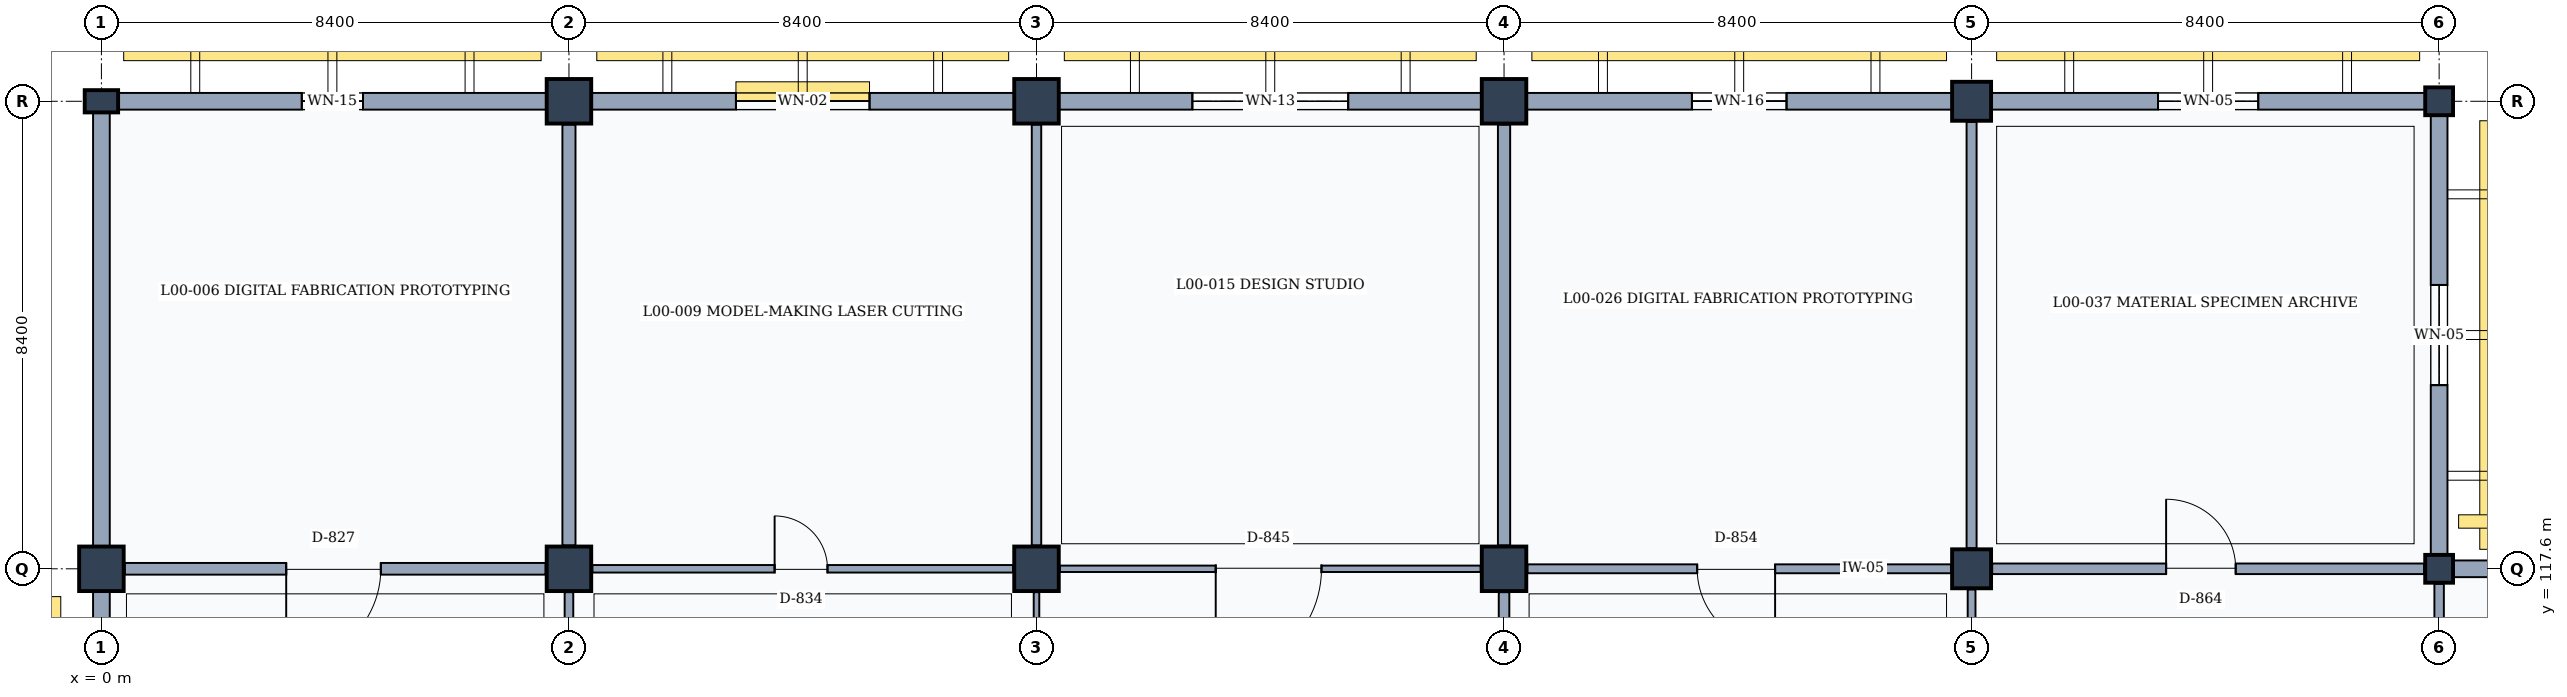
"""IFC4 building model, lengths in metres.
Left out: names, types, materials, properties, quantities, classifications, styles, units other than length and angle.
Written with IfcOpenShell. Run it as: python <this file> out.ifc"""

import sys

from ifc_helpers import new_model, si_unit, direction, frame, frame_2d, origin, origin_2d, place, context, subcontext, project, spatial, rectangle, extrude, element, fill, save


model = new_model("IFC4")
c1 = context("Model", 3, precision=1e-05, world=origin(), true_north=direction((0.0, 1.0)))
c2 = subcontext(c1, "Body", "Model", "MODEL_VIEW")
j1 = project(units=[si_unit("LENGTHUNIT", "METRE"), si_unit("PLANEANGLEUNIT", "RADIAN")], contexts=[c1])
p1 = place(None, origin())
s1 = spatial("IfcSite", under=j1, at=p1, CompositionType="ELEMENT")
p2 = place(p1, origin())
s2 = spatial("IfcBuilding", under=s1, at=p2, CompositionType="ELEMENT")
p3 = place(p2, origin())
s3 = spatial("IfcBuildingStorey", under=s2, at=p3, CompositionType="ELEMENT", Elevation=0.0)
p4 = place(p3, frame((0.0, 117.6, 0.0), z_axis=(0.0, 0.0, 1.0), x_axis=(1.0, 0.0, 0.0)))
e1 = element("IfcColumn", 1, at=p4, inside=s3, PredefinedType="COLUMN", context=c2, shape_type="SweptSolid", body=[
    extrude(rectangle(XDim=0.8, YDim=0.8, at=origin_2d()), origin(), (0.0, 0.0, 1.0), 4.8),
])
p5 = place(p3, frame((0.0, 126.0, 0.0), z_axis=(0.0, 0.0, 1.0), x_axis=(1.0, 0.0, 0.0)))
e2 = element("IfcColumn", 2, at=p5, inside=s3, PredefinedType="PILASTER", context=c2, shape_type="SweptSolid", body=[
    extrude(rectangle(XDim=0.6, YDim=0.4, at=origin_2d()), origin(), (0.0, 0.0, 1.0), 4.8),
])
for number, where, z_axis, x_axis in (
    (3, (8.4, 117.6, 0.0), (0.0, 0.0, 1.0), (1.0, 0.0, 0.0)),
    (4, (8.4, 126.0, 0.0), (0.0, 0.0, 1.0), (1.0, 0.0, 0.0)),
    (5, (16.8, 117.6, 0.0), (0.0, 0.0, 1.0), (1.0, 0.0, 0.0)),
    (6, (16.8, 126.0, 0.0), (0.0, 0.0, 1.0), (1.0, 0.0, 0.0)),
    (7, (25.2, 117.6, 0.0), (0.0, 0.0, 1.0), (1.0, 0.0, 0.0)),
    (8, (25.2, 126.0, 0.0), (0.0, 0.0, 1.0), (1.0, 0.0, 0.0)),
):
    element("IfcColumn", number, at=place(p3, frame(where, z_axis=z_axis, x_axis=x_axis)), inside=s3, PredefinedType="COLUMN", context=c2, shape_type="SweptSolid", body=[
        extrude(rectangle(XDim=0.8, YDim=0.8, at=origin_2d()), origin(), (0.0, 0.0, 1.0), 4.8),
    ])
for number, where, z_axis, x_axis in (
    (9, (33.6, 117.6, 0.0), (0.0, 0.0, 1.0), (1.0, 0.0, 0.0)),
    (10, (33.6, 126.0, 0.0), (0.0, 0.0, 1.0), (1.0, 0.0, 0.0)),
):
    element("IfcColumn", number, at=place(p3, frame(where, z_axis=z_axis, x_axis=x_axis)), inside=s3, PredefinedType="COLUMN", context=c2, shape_type="SweptSolid", body=[
        extrude(rectangle(XDim=0.7, YDim=0.7, at=origin_2d()), origin(), (0.0, 0.0, 1.0), 4.8),
    ])
for number, where, z_axis, x_axis in (
    (11, (42.0, 117.6, 0.0), (0.0, 0.0, 1.0), (1.0, 0.0, 0.0)),
    (12, (42.0, 126.0, 0.0), (0.0, 0.0, 1.0), (1.0, 0.0, 0.0)),
):
    element("IfcColumn", number, at=place(p3, frame(where, z_axis=z_axis, x_axis=x_axis)), inside=s3, PredefinedType="COLUMN", context=c2, shape_type="SweptSolid", body=[
        extrude(rectangle(XDim=0.5, YDim=0.5, at=origin_2d()), origin(), (0.0, 0.0, 1.0), 4.8),
    ])
p6 = place(p3, frame((0.0, 109.6, 0.0), z_axis=(0.0, 0.0, 1.0), x_axis=(0.0, 1.0, 0.0)))
e13 = element("IfcWall", 13, at=p6, inside=s3, PredefinedType="SOLIDWALL", context=c2, shape_type="SweptSolid", body=[
    extrude(rectangle(XDim=7.6, YDim=0.3, at=frame_2d((3.8, 0.0))), origin(), (0.0, 0.0, 1.0), 3.96),
])
p7 = place(p6, frame((2.3, 0.0, 0.95)))
e14 = element("IfcOpeningElement", 14, at=p7, cuts=e13, PredefinedType="OPENING", context=c2, shape_type="SweptSolid", body=[
    extrude(rectangle(XDim=3.0, YDim=1.8, at=frame_2d((1.5, 0.9))), frame((0.0, 0.16, 0.0), z_axis=(0.0, -1.0, 0.0), x_axis=(1.0, 0.0, 0.0)), (0.0, 0.0, 1.0), 0.32),
])
p8 = place(p3, frame((0.3, 126.0, 0.0), z_axis=(0.0, 0.0, 1.0), x_axis=(1.0, 0.0, 0.0)))
e15 = element("IfcWall", 15, at=p8, inside=s3, PredefinedType="SOLIDWALL", context=c2, shape_type="SweptSolid", body=[
    extrude(rectangle(XDim=7.7, YDim=0.3, at=frame_2d((3.85, 0.0))), origin(), (0.0, 0.0, 1.0), 3.96),
])
p9 = place(p8, frame((3.3, 0.0, 0.95)))
e16 = element("IfcOpeningElement", 16, at=p9, cuts=e15, PredefinedType="OPENING", context=c2, shape_type="SweptSolid", body=[
    extrude(rectangle(XDim=1.1, YDim=1.95, at=frame_2d((0.55, 0.975))), frame((0.0, 0.16, 0.0), z_axis=(0.0, -1.0, 0.0), x_axis=(1.0, 0.0, 0.0)), (0.0, 0.0, 1.0), 0.32),
])
p10 = place(p3, frame((0.0, 118.0, 0.0), z_axis=(0.0, 0.0, 1.0), x_axis=(0.0, 1.0, 0.0)))
e17 = element("IfcWall", 17, at=p10, inside=s3, PredefinedType="SOLIDWALL", context=c2, shape_type="SweptSolid", body=[
    extrude(rectangle(XDim=7.8, YDim=0.3, at=frame_2d((3.9, 0.0))), origin(), (0.0, 0.0, 1.0), 3.96),
])
p11 = place(p3, frame((8.8, 126.0, 0.0), z_axis=(0.0, 0.0, 1.0), x_axis=(1.0, 0.0, 0.0)))
e18 = element("IfcWall", 18, at=p11, inside=s3, PredefinedType="SOLIDWALL", context=c2, shape_type="SweptSolid", body=[
    extrude(rectangle(XDim=7.6, YDim=0.3, at=frame_2d((3.8, 0.0))), origin(), (0.0, 0.0, 1.0), 3.96),
])
p12 = place(p11, frame((2.6, 0.0, 0.95)))
e19 = element("IfcOpeningElement", 19, at=p12, cuts=e18, PredefinedType="OPENING", context=c2, shape_type="SweptSolid", body=[
    extrude(rectangle(XDim=2.4, YDim=1.8, at=frame_2d((1.2, 0.9))), frame((0.0, 0.16, 0.0), z_axis=(0.0, -1.0, 0.0), x_axis=(1.0, 0.0, 0.0)), (0.0, 0.0, 1.0), 0.32),
])
p13 = place(p3, frame((17.2, 126.0, 0.0), z_axis=(0.0, 0.0, 1.0), x_axis=(1.0, 0.0, 0.0)))
e20 = element("IfcWall", 20, at=p13, inside=s3, PredefinedType="SOLIDWALL", context=c2, shape_type="SweptSolid", body=[
    extrude(rectangle(XDim=7.6, YDim=0.3, at=frame_2d((3.8, 0.0))), origin(), (0.0, 0.0, 1.0), 3.96),
])
p14 = place(p13, frame((2.4, 0.0, 0.95)))
e21 = element("IfcOpeningElement", 21, at=p14, cuts=e20, PredefinedType="OPENING", context=c2, shape_type="SweptSolid", body=[
    extrude(rectangle(XDim=2.8, YDim=1.65, at=frame_2d((1.4, 0.825))), frame((0.0, 0.16, 0.0), z_axis=(0.0, -1.0, 0.0), x_axis=(1.0, 0.0, 0.0)), (0.0, 0.0, 1.0), 0.32),
])
p15 = place(p3, frame((25.6, 126.0, 0.0), z_axis=(0.0, 0.0, 1.0), x_axis=(1.0, 0.0, 0.0)))
e22 = element("IfcWall", 22, at=p15, inside=s3, PredefinedType="SOLIDWALL", context=c2, shape_type="SweptSolid", body=[
    extrude(rectangle(XDim=7.65, YDim=0.3, at=frame_2d((3.825, 0.0))), origin(), (0.0, 0.0, 1.0), 3.96),
])
p16 = place(p15, frame((2.975, 0.0, 0.95)))
e23 = element("IfcOpeningElement", 23, at=p16, cuts=e22, PredefinedType="OPENING", context=c2, shape_type="SweptSolid", body=[
    extrude(rectangle(XDim=1.7, YDim=1.55, at=frame_2d((0.85, 0.775))), frame((0.0, 0.16, 0.0), z_axis=(0.0, -1.0, 0.0), x_axis=(1.0, 0.0, 0.0)), (0.0, 0.0, 1.0), 0.32),
])
p17 = place(p3, frame((33.95, 126.0, 0.0), z_axis=(0.0, 0.0, 1.0), x_axis=(1.0, 0.0, 0.0)))
e24 = element("IfcWall", 24, at=p17, inside=s3, PredefinedType="SOLIDWALL", context=c2, shape_type="SweptSolid", body=[
    extrude(rectangle(XDim=7.8, YDim=0.3, at=frame_2d((3.9, 0.0))), origin(), (0.0, 0.0, 1.0), 3.96),
])
p18 = place(p17, frame((3.0, 0.0, 0.95)))
e25 = element("IfcOpeningElement", 25, at=p18, cuts=e24, PredefinedType="OPENING", context=c2, shape_type="SweptSolid", body=[
    extrude(rectangle(XDim=1.8, YDim=1.5, at=frame_2d((0.9, 0.75))), frame((0.0, 0.16, 0.0), z_axis=(0.0, -1.0, 0.0), x_axis=(1.0, 0.0, 0.0)), (0.0, 0.0, 1.0), 0.32),
])
p19 = place(p3, frame((42.0, 125.75, 0.0), z_axis=(0.0, 0.0, 1.0), x_axis=(0.0, -1.0, 0.0)))
e26 = element("IfcWall", 26, at=p19, inside=s3, PredefinedType="SOLIDWALL", context=c2, shape_type="SweptSolid", body=[
    extrude(rectangle(XDim=7.9, YDim=0.3, at=frame_2d((3.95, 0.0))), origin(), (0.0, 0.0, 1.0), 3.96),
])
p20 = place(p19, frame((3.05, 0.0, 0.95)))
e27 = element("IfcOpeningElement", 27, at=p20, cuts=e26, PredefinedType="OPENING", context=c2, shape_type="SweptSolid", body=[
    extrude(rectangle(XDim=1.8, YDim=1.5, at=frame_2d((0.9, 0.75))), frame((0.0, 0.16, 0.0), z_axis=(0.0, -1.0, 0.0), x_axis=(1.0, 0.0, 0.0)), (0.0, 0.0, 1.0), 0.32),
])
p21 = place(p3, frame((42.25, 117.6, 0.0), z_axis=(0.0, 0.0, 1.0), x_axis=(1.0, 0.0, 0.0)))
e28 = element("IfcWall", 28, at=p21, inside=s3, PredefinedType="SOLIDWALL", context=c2, shape_type="SweptSolid", body=[
    extrude(rectangle(XDim=7.85, YDim=0.3, at=frame_2d((3.925, 0.0))), origin(), (0.0, 0.0, 1.0), 3.96),
])
p22 = place(p21, frame((2.525, 0.0, 0.95)))
e29 = element("IfcOpeningElement", 29, at=p22, cuts=e28, PredefinedType="OPENING", context=c2, shape_type="SweptSolid", body=[
    extrude(rectangle(XDim=2.8, YDim=1.65, at=frame_2d((1.4, 0.825))), frame((0.0, 0.16, 0.0), z_axis=(0.0, -1.0, 0.0), x_axis=(1.0, 0.0, 0.0)), (0.0, 0.0, 1.0), 0.32),
])
p23 = place(p3, frame((8.4, 109.645, 0.0), z_axis=(0.0, 0.0, 1.0), x_axis=(0.0, 1.0, 0.0)))
e30 = element("IfcWall", 30, at=p23, inside=s3, PredefinedType="PARTITIONING", context=c2, shape_type="SweptSolid", body=[
    extrude(rectangle(XDim=7.535, YDim=0.155, at=frame_2d((3.768, 0.0))), origin(), (0.0, 0.0, 1.0), 3.92),
])
p24 = place(p3, frame((0.42, 117.6, 0.0), z_axis=(0.0, 0.0, 1.0), x_axis=(1.0, 0.0, 0.0)))
e31 = element("IfcWall", 31, at=p24, inside=s3, PredefinedType="PARTITIONING", context=c2, shape_type="SweptSolid", body=[
    extrude(rectangle(XDim=7.56, YDim=0.21, at=frame_2d((3.78, 0.0))), origin(), (0.0, 0.0, 1.0), 3.87),
])
p25 = place(p24, frame((2.9, 0.0, 0.0)))
e32 = element("IfcOpeningElement", 32, at=p25, cuts=e31, PredefinedType="OPENING", context=c2, shape_type="SweptSolid", body=[
    extrude(rectangle(XDim=1.7, YDim=2.3, at=frame_2d((0.85, 1.15))), frame((0.0, 0.115, 0.0), z_axis=(0.0, -1.0, 0.0), x_axis=(1.0, 0.0, 0.0)), (0.0, 0.0, 1.0), 0.23),
])
p26 = place(p3, frame((8.4, 118.02, 0.0), z_axis=(0.0, 0.0, 1.0), x_axis=(0.0, 1.0, 0.0)))
e33 = element("IfcWall", 33, at=p26, inside=s3, PredefinedType="PARTITIONING", context=c2, shape_type="SweptSolid", body=[
    extrude(rectangle(XDim=7.56, YDim=0.235, at=frame_2d((3.78, 0.0))), origin(), (0.0, 0.0, 1.0), 3.92),
])
p27 = place(p3, frame((16.8, 109.645, 0.0), z_axis=(0.0, 0.0, 1.0), x_axis=(0.0, 1.0, 0.0)))
e34 = element("IfcWall", 34, at=p27, inside=s3, PredefinedType="MOVABLE", context=c2, shape_type="SweptSolid", body=[
    extrude(rectangle(XDim=7.535, YDim=0.1, at=frame_2d((3.768, 0.0))), origin(), (0.0, 0.0, 1.0), 3.92),
])
p28 = place(p27, frame((3.25, 0.0, 0.0)))
e35 = element("IfcOpeningElement", 35, at=p28, cuts=e34, PredefinedType="OPENING", context=c2, shape_type="SweptSolid", body=[
    extrude(rectangle(XDim=1.0, YDim=2.15, at=frame_2d((0.5, 1.075))), frame((0.0, 0.06, 0.0), z_axis=(0.0, -1.0, 0.0), x_axis=(1.0, 0.0, 0.0)), (0.0, 0.0, 1.0), 0.12),
])
p29 = place(p3, frame((8.82, 117.6, 0.0), z_axis=(0.0, 0.0, 1.0), x_axis=(1.0, 0.0, 0.0)))
e36 = element("IfcWall", 36, at=p29, inside=s3, PredefinedType="PARTITIONING", context=c2, shape_type="SweptSolid", body=[
    extrude(rectangle(XDim=7.56, YDim=0.135, at=frame_2d((3.78, 0.0))), origin(), (0.0, 0.0, 1.0), 3.87),
])
p30 = place(p29, frame((3.275, 0.0, 0.0)))
e37 = element("IfcOpeningElement", 37, at=p30, cuts=e36, PredefinedType="OPENING", context=c2, shape_type="SweptSolid", body=[
    extrude(rectangle(XDim=0.95, YDim=2.15, at=frame_2d((0.475, 1.075))), frame((0.0, 0.077, 0.0), z_axis=(0.0, -1.0, 0.0), x_axis=(1.0, 0.0, 0.0)), (0.0, 0.0, 1.0), 0.155),
])
p31 = place(p3, frame((16.8, 118.02, 0.0), z_axis=(0.0, 0.0, 1.0), x_axis=(0.0, 1.0, 0.0)))
e38 = element("IfcWall", 38, at=p31, inside=s3, PredefinedType="PARTITIONING", context=c2, shape_type="SweptSolid", body=[
    extrude(rectangle(XDim=7.56, YDim=0.17, at=frame_2d((3.78, 0.0))), origin(), (0.0, 0.0, 1.0), 3.92),
])
p32 = place(p3, frame((25.2, 109.62, 0.0), z_axis=(0.0, 0.0, 1.0), x_axis=(0.0, 1.0, 0.0)))
e39 = element("IfcWall", 39, at=p32, inside=s3, PredefinedType="PARTITIONING", context=c2, shape_type="SweptSolid", body=[
    extrude(rectangle(XDim=7.56, YDim=0.19, at=frame_2d((3.78, 0.0))), origin(), (0.0, 0.0, 1.0), 3.92),
])
p33 = place(p3, frame((17.22, 117.6, 0.0), z_axis=(0.0, 0.0, 1.0), x_axis=(1.0, 0.0, 0.0)))
e40 = element("IfcWall", 40, at=p33, inside=s3, PredefinedType="PARTITIONING", context=c2, shape_type="SweptSolid", body=[
    extrude(rectangle(XDim=7.56, YDim=0.115, at=frame_2d((3.78, 0.0))), origin(), (0.0, 0.0, 1.0), 3.87),
])
p34 = place(p33, frame((2.8, 0.0, 0.0)))
e41 = element("IfcOpeningElement", 41, at=p34, cuts=e40, PredefinedType="OPENING", context=c2, shape_type="SweptSolid", body=[
    extrude(rectangle(XDim=1.9, YDim=2.4, at=frame_2d((0.95, 1.2))), frame((0.0, 0.067, 0.0), z_axis=(0.0, -1.0, 0.0), x_axis=(1.0, 0.0, 0.0)), (0.0, 0.0, 1.0), 0.135),
])
p35 = place(p3, frame((25.2, 118.02, 0.0), z_axis=(0.0, 0.0, 1.0), x_axis=(0.0, 1.0, 0.0)))
e42 = element("IfcWall", 42, at=p35, inside=s3, PredefinedType="PARTITIONING", context=c2, shape_type="SweptSolid", body=[
    extrude(rectangle(XDim=7.56, YDim=0.22, at=frame_2d((3.78, 0.0))), origin(), (0.0, 0.0, 1.0), 3.92),
])
p36 = place(p3, frame((33.6, 109.57, 0.0), z_axis=(0.0, 0.0, 1.0), x_axis=(0.0, 1.0, 0.0)))
e43 = element("IfcWall", 43, at=p36, inside=s3, PredefinedType="PARTITIONING", context=c2, shape_type="SweptSolid", body=[
    extrude(rectangle(XDim=7.66, YDim=0.14, at=frame_2d((3.83, 0.0))), origin(), (0.0, 0.0, 1.0), 3.92),
])
p37 = place(p3, frame((25.62, 117.6, 0.0), z_axis=(0.0, 0.0, 1.0), x_axis=(1.0, 0.0, 0.0)))
e44 = element("IfcWall", 44, at=p37, inside=s3, PredefinedType="PARTITIONING", context=c2, shape_type="SweptSolid", body=[
    extrude(rectangle(XDim=7.61, YDim=0.16, at=frame_2d((3.805, 0.0))), origin(), (0.0, 0.0, 1.0), 3.87),
])
p38 = place(p37, frame((3.05, 0.0, 0.0)))
e45 = element("IfcOpeningElement", 45, at=p38, cuts=e44, PredefinedType="OPENING", context=c2, shape_type="SweptSolid", body=[
    extrude(rectangle(XDim=1.4, YDim=2.25, at=frame_2d((0.7, 1.125))), frame((0.0, 0.09, 0.0), z_axis=(0.0, -1.0, 0.0), x_axis=(1.0, 0.0, 0.0)), (0.0, 0.0, 1.0), 0.18),
])
p39 = place(p3, frame((33.6, 117.97, 0.0), z_axis=(0.0, 0.0, 1.0), x_axis=(0.0, 1.0, 0.0)))
e46 = element("IfcWall", 46, at=p39, inside=s3, PredefinedType="PARTITIONING", context=c2, shape_type="SweptSolid", body=[
    extrude(rectangle(XDim=7.66, YDim=0.18, at=frame_2d((3.83, 0.0))), origin(), (0.0, 0.0, 1.0), 3.92),
])
p40 = place(p3, frame((42.0, 109.47, 0.0), z_axis=(0.0, 0.0, 1.0), x_axis=(0.0, 1.0, 0.0)))
e47 = element("IfcWall", 47, at=p40, inside=s3, PredefinedType="PARTITIONING", context=c2, shape_type="SweptSolid", body=[
    extrude(rectangle(XDim=7.86, YDim=0.17, at=frame_2d((3.93, 0.0))), origin(), (0.0, 0.0, 1.0), 3.92),
])
p41 = place(p3, frame((33.97, 117.6, 0.0), z_axis=(0.0, 0.0, 1.0), x_axis=(1.0, 0.0, 0.0)))
e48 = element("IfcWall", 48, at=p41, inside=s3, PredefinedType="PARTITIONING", context=c2, shape_type="SweptSolid", body=[
    extrude(rectangle(XDim=7.76, YDim=0.19, at=frame_2d((3.88, 0.0))), origin(), (0.0, 0.0, 1.0), 3.87),
])
p42 = place(p41, frame((3.125, 0.0, 0.0)))
e49 = element("IfcOpeningElement", 49, at=p42, cuts=e48, PredefinedType="OPENING", context=c2, shape_type="SweptSolid", body=[
    extrude(rectangle(XDim=1.25, YDim=2.3, at=frame_2d((0.625, 1.15))), frame((0.0, 0.105, 0.0), z_axis=(0.0, -1.0, 0.0), x_axis=(1.0, 0.0, 0.0)), (0.0, 0.0, 1.0), 0.21),
])
p43 = place(p9, origin())
e50 = element("IfcWindow", 50, at=p43, inside=s3, PartitioningType="SINGLE_PANEL", PredefinedType="WINDOW", context=c2, shape_type="SweptSolid", body=[
    extrude(rectangle(XDim=1.1, YDim=1.95, at=frame_2d((0.55, 0.975))), frame((0.0, 0.03, 0.0), z_axis=(0.0, -1.0, 0.0), x_axis=(1.0, 0.0, 0.0)), (0.0, 0.0, 1.0), 0.06),
])
fill(e16, e50)
p44 = place(p12, origin())
e51 = element("IfcWindow", 51, at=p44, inside=s3, PartitioningType="SINGLE_PANEL", PredefinedType="WINDOW", context=c2, shape_type="SweptSolid", body=[
    extrude(rectangle(XDim=2.4, YDim=1.8, at=frame_2d((1.2, 0.9))), frame((0.0, 0.03, 0.0), z_axis=(0.0, -1.0, 0.0), x_axis=(1.0, 0.0, 0.0)), (0.0, 0.0, 1.0), 0.06),
])
fill(e19, e51)
p45 = place(p14, origin())
e52 = element("IfcWindow", 52, at=p45, inside=s3, PartitioningType="SINGLE_PANEL", PredefinedType="WINDOW", context=c2, shape_type="SweptSolid", body=[
    extrude(rectangle(XDim=2.8, YDim=1.65, at=frame_2d((1.4, 0.825))), frame((0.0, 0.03, 0.0), z_axis=(0.0, -1.0, 0.0), x_axis=(1.0, 0.0, 0.0)), (0.0, 0.0, 1.0), 0.06),
])
fill(e21, e52)
p46 = place(p16, origin())
e53 = element("IfcWindow", 53, at=p46, inside=s3, PartitioningType="SINGLE_PANEL", PredefinedType="WINDOW", context=c2, shape_type="SweptSolid", body=[
    extrude(rectangle(XDim=1.7, YDim=1.55, at=frame_2d((0.85, 0.775))), frame((0.0, 0.03, 0.0), z_axis=(0.0, -1.0, 0.0), x_axis=(1.0, 0.0, 0.0)), (0.0, 0.0, 1.0), 0.06),
])
fill(e23, e53)
p47 = place(p18, origin())
e54 = element("IfcWindow", 54, at=p47, inside=s3, PartitioningType="SINGLE_PANEL", PredefinedType="WINDOW", context=c2, shape_type="SweptSolid", body=[
    extrude(rectangle(XDim=1.8, YDim=1.5, at=frame_2d((0.9, 0.75))), frame((0.0, 0.03, 0.0), z_axis=(0.0, -1.0, 0.0), x_axis=(1.0, 0.0, 0.0)), (0.0, 0.0, 1.0), 0.06),
])
fill(e25, e54)
p48 = place(p20, origin())
e55 = element("IfcWindow", 55, at=p48, inside=s3, PartitioningType="SINGLE_PANEL", PredefinedType="WINDOW", context=c2, shape_type="SweptSolid", body=[
    extrude(rectangle(XDim=1.8, YDim=1.5, at=frame_2d((0.9, 0.75))), frame((0.0, 0.03, 0.0), z_axis=(0.0, -1.0, 0.0), x_axis=(1.0, 0.0, 0.0)), (0.0, 0.0, 1.0), 0.06),
])
fill(e27, e55)
p49 = place(p25, frame((1.7, 0.0, 0.0), z_axis=(0.0, 0.0, 1.0), x_axis=(-1.0, 0.0, 0.0)))
e56 = element("IfcDoor", 56, at=p49, inside=s3, OperationType="SINGLE_SWING_RIGHT", PredefinedType="DOOR", context=c2, shape_type="SweptSolid", body=[
    extrude(rectangle(XDim=1.7, YDim=2.3, at=frame_2d((0.85, 1.15))), frame((0.0, 0.025, 0.0), z_axis=(0.0, -1.0, 0.0), x_axis=(1.0, 0.0, 0.0)), (0.0, 0.0, 1.0), 0.05),
])
fill(e32, e56)
p50 = place(p30, origin())
e57 = element("IfcDoor", 57, at=p50, inside=s3, OperationType="SINGLE_SWING_LEFT", PredefinedType="DOOR", context=c2, shape_type="SweptSolid", body=[
    extrude(rectangle(XDim=0.95, YDim=2.15, at=frame_2d((0.475, 1.075))), frame((0.0, 0.025, 0.0), z_axis=(0.0, -1.0, 0.0), x_axis=(1.0, 0.0, 0.0)), (0.0, 0.0, 1.0), 0.05),
])
fill(e37, e57)
p51 = place(p34, frame((1.9, 0.0, 0.0), z_axis=(0.0, 0.0, 1.0), x_axis=(-1.0, 0.0, 0.0)))
e58 = element("IfcDoor", 58, at=p51, inside=s3, OperationType="SINGLE_SWING_RIGHT", PredefinedType="DOOR", context=c2, shape_type="SweptSolid", body=[
    extrude(rectangle(XDim=1.9, YDim=2.4, at=frame_2d((0.95, 1.2))), frame((0.0, 0.025, 0.0), z_axis=(0.0, -1.0, 0.0), x_axis=(1.0, 0.0, 0.0)), (0.0, 0.0, 1.0), 0.05),
])
fill(e41, e58)
p52 = place(p38, frame((1.4, 0.0, 0.0), z_axis=(0.0, 0.0, 1.0), x_axis=(-1.0, 0.0, 0.0)))
e59 = element("IfcDoor", 59, at=p52, inside=s3, OperationType="SINGLE_SWING_LEFT", PredefinedType="DOOR", context=c2, shape_type="SweptSolid", body=[
    extrude(rectangle(XDim=1.4, YDim=2.25, at=frame_2d((0.7, 1.125))), frame((0.0, 0.025, 0.0), z_axis=(0.0, -1.0, 0.0), x_axis=(1.0, 0.0, 0.0)), (0.0, 0.0, 1.0), 0.05),
])
fill(e45, e59)
p53 = place(p42, origin())
e60 = element("IfcDoor", 60, at=p53, inside=s3, OperationType="SINGLE_SWING_LEFT", PredefinedType="DOOR", context=c2, shape_type="SweptSolid", body=[
    extrude(rectangle(XDim=1.25, YDim=2.3, at=frame_2d((0.625, 1.15))), frame((0.0, 0.025, 0.0), z_axis=(0.0, -1.0, 0.0), x_axis=(1.0, 0.0, 0.0)), (0.0, 0.0, 1.0), 0.05),
])
fill(e49, e60)
save(model, sys.argv[1])
